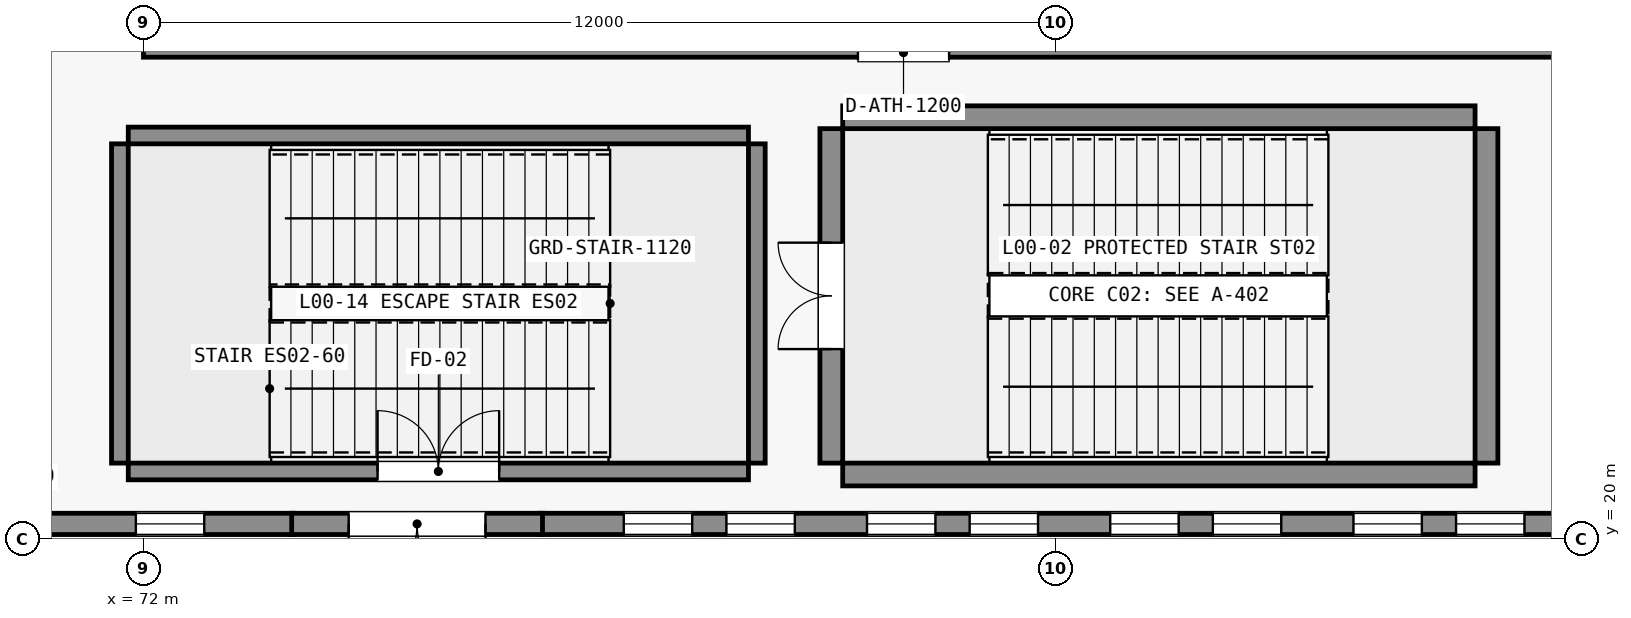
"""IFC4 building model, lengths in metres.
Left out: names, types, materials, properties, quantities, classifications, styles, units other than length and angle.
Written with IfcOpenShell. Run it as: python <this file> out.ifc"""

import sys

from ifc_helpers import new_model, si_unit, direction, frame, frame_2d, origin, place, context, subcontext, project, spatial, rectangle, extrude, element, fill, save


model = new_model("IFC4")
c1 = context("Model", 3, precision=1e-05, world=origin(), true_north=direction((0.0, 1.0)))
c2 = subcontext(c1, "Body", "Model", "MODEL_VIEW")
j1 = project(units=[si_unit("LENGTHUNIT", "METRE"), si_unit("PLANEANGLEUNIT", "RADIAN")], contexts=[c1])
p1 = place(None, origin())
s1 = spatial("IfcSite", under=j1, at=p1, CompositionType="ELEMENT")
p2 = place(p1, origin())
s2 = spatial("IfcBuilding", under=s1, at=p2, CompositionType="ELEMENT")
p3 = place(p2, origin())
s3 = spatial("IfcBuildingStorey", under=s2, at=p3, CompositionType="ELEMENT", Elevation=0.0)
for number, where, z_axis, x_axis in (
    (1, (81.2, 20.85, 0.0), (0.0, 0.0, 1.0), (1.0, 0.0, 0.0)),
    (2, (81.2, 25.55, 0.0), (0.0, 0.0, 1.0), (1.0, 0.0, 0.0)),
):
    element("IfcWall", number, at=place(p3, frame(where, z_axis=z_axis, x_axis=x_axis)), inside=s3, PredefinedType="SHEAR", context=c2, shape_type="SweptSolid", body=[
        extrude(rectangle(XDim=8.32, YDim=0.3, at=frame_2d((4.16, 0.0))), origin(), (0.0, 0.0, 1.0), 6.0),
    ])
p4 = place(p3, frame((81.05, 21.0, 0.0), z_axis=(0.0, 0.0, 1.0), x_axis=(0.0, 1.0, 0.0)))
e3 = element("IfcWall", 3, at=p4, inside=s3, PredefinedType="SHEAR", context=c2, shape_type="SweptSolid", body=[
    extrude(rectangle(XDim=4.4, YDim=0.3, at=frame_2d((2.2, 0.0))), origin(), (0.0, 0.0, 1.0), 6.0),
])
p5 = place(p4, frame((1.5, 0.0, 0.0)))
e4 = element("IfcOpeningElement", 4, at=p5, cuts=e3, PredefinedType="OPENING", context=c2, shape_type="SweptSolid", body=[
    extrude(rectangle(XDim=1.4, YDim=2.2, at=frame_2d((0.7, 1.1))), frame((0.0, 0.16, 0.0), z_axis=(0.0, -1.0, 0.0), x_axis=(1.0, 0.0, 0.0)), (0.0, 0.0, 1.0), 0.32),
])
p6 = place(p3, frame((89.67, 21.0, 0.0), z_axis=(0.0, 0.0, 1.0), x_axis=(0.0, 1.0, 0.0)))
e5 = element("IfcWall", 5, at=p6, inside=s3, PredefinedType="SHEAR", context=c2, shape_type="SweptSolid", body=[
    extrude(rectangle(XDim=4.4, YDim=0.3, at=frame_2d((2.2, 0.0))), origin(), (0.0, 0.0, 1.0), 6.0),
])
p7 = place(p3, frame((47.05, 20.2, 0.0), z_axis=(0.0, 0.0, 1.0), x_axis=(1.0, 0.0, 0.0)))
e6 = element("IfcWall", 6, at=p7, inside=s3, PredefinedType="STANDARD", context=c2, shape_type="SweptSolid", body=[
    extrude(rectangle(XDim=26.93, YDim=0.28, at=frame_2d((13.465, 0.0))), origin(), (0.0, 0.0, 1.0), 5.64),
])
p8 = place(p7, frame((18.8, 0.0, 0.0)))
e7 = element("IfcOpeningElement", 7, at=p8, cuts=e6, PredefinedType="OPENING", context=c2, shape_type="SweptSolid", body=[
    extrude(rectangle(XDim=2.4, YDim=2.5, at=frame_2d((1.2, 1.25))), frame((0.0, 0.15, 0.0), z_axis=(0.0, -1.0, 0.0), x_axis=(1.0, 0.0, 0.0)), (0.0, 0.0, 1.0), 0.3),
])
p9 = place(p7, frame((2.45, 0.0, 0.95)))
e8 = element("IfcOpeningElement", 8, at=p9, cuts=e6, PredefinedType="OPENING", context=c2, shape_type="SweptSolid", body=[
    extrude(rectangle(XDim=0.9, YDim=2.85, at=frame_2d((0.45, 1.425))), frame((0.0, 0.15, 0.0), z_axis=(0.0, -1.0, 0.0), x_axis=(1.0, 0.0, 0.0)), (0.0, 0.0, 1.0), 0.3),
])
p10 = place(p7, frame((4.3, 0.0, 0.95)))
e9 = element("IfcOpeningElement", 9, at=p10, cuts=e6, PredefinedType="OPENING", context=c2, shape_type="SweptSolid", body=[
    extrude(rectangle(XDim=0.9, YDim=2.85, at=frame_2d((0.45, 1.425))), frame((0.0, 0.15, 0.0), z_axis=(0.0, -1.0, 0.0), x_axis=(1.0, 0.0, 0.0)), (0.0, 0.0, 1.0), 0.3),
])
p11 = place(p7, frame((5.65, 0.0, 0.95)))
e10 = element("IfcOpeningElement", 10, at=p11, cuts=e6, PredefinedType="OPENING", context=c2, shape_type="SweptSolid", body=[
    extrude(rectangle(XDim=0.9, YDim=2.85, at=frame_2d((0.45, 1.425))), frame((0.0, 0.15, 0.0), z_axis=(0.0, -1.0, 0.0), x_axis=(1.0, 0.0, 0.0)), (0.0, 0.0, 1.0), 0.3),
])
p12 = place(p7, frame((7.5, 0.0, 0.95)))
e11 = element("IfcOpeningElement", 11, at=p12, cuts=e6, PredefinedType="OPENING", context=c2, shape_type="SweptSolid", body=[
    extrude(rectangle(XDim=0.9, YDim=2.85, at=frame_2d((0.45, 1.425))), frame((0.0, 0.15, 0.0), z_axis=(0.0, -1.0, 0.0), x_axis=(1.0, 0.0, 0.0)), (0.0, 0.0, 1.0), 0.3),
])
p13 = place(p7, frame((8.85, 0.0, 0.95)))
e12 = element("IfcOpeningElement", 12, at=p13, cuts=e6, PredefinedType="OPENING", context=c2, shape_type="SweptSolid", body=[
    extrude(rectangle(XDim=0.9, YDim=2.85, at=frame_2d((0.45, 1.425))), frame((0.0, 0.15, 0.0), z_axis=(0.0, -1.0, 0.0), x_axis=(1.0, 0.0, 0.0)), (0.0, 0.0, 1.0), 0.3),
])
p14 = place(p7, frame((13.9, 0.0, 0.95)))
e13 = element("IfcOpeningElement", 13, at=p14, cuts=e6, PredefinedType="OPENING", context=c2, shape_type="SweptSolid", body=[
    extrude(rectangle(XDim=0.9, YDim=2.85, at=frame_2d((0.45, 1.425))), frame((0.0, 0.15, 0.0), z_axis=(0.0, -1.0, 0.0), x_axis=(1.0, 0.0, 0.0)), (0.0, 0.0, 1.0), 0.3),
])
p15 = place(p7, frame((15.25, 0.0, 0.95)))
e14 = element("IfcOpeningElement", 14, at=p15, cuts=e6, PredefinedType="OPENING", context=c2, shape_type="SweptSolid", body=[
    extrude(rectangle(XDim=0.9, YDim=2.85, at=frame_2d((0.45, 1.425))), frame((0.0, 0.15, 0.0), z_axis=(0.0, -1.0, 0.0), x_axis=(1.0, 0.0, 0.0)), (0.0, 0.0, 1.0), 0.3),
])
p16 = place(p7, frame((17.1, 0.0, 0.95)))
e15 = element("IfcOpeningElement", 15, at=p16, cuts=e6, PredefinedType="OPENING", context=c2, shape_type="SweptSolid", body=[
    extrude(rectangle(XDim=0.9, YDim=2.85, at=frame_2d((0.45, 1.425))), frame((0.0, 0.15, 0.0), z_axis=(0.0, -1.0, 0.0), x_axis=(1.0, 0.0, 0.0)), (0.0, 0.0, 1.0), 0.3),
])
p17 = place(p7, frame((24.85, 0.0, 0.95)))
e16 = element("IfcOpeningElement", 16, at=p17, cuts=e6, PredefinedType="OPENING", context=c2, shape_type="SweptSolid", body=[
    extrude(rectangle(XDim=0.9, YDim=2.85, at=frame_2d((0.45, 1.425))), frame((0.0, 0.15, 0.0), z_axis=(0.0, -1.0, 0.0), x_axis=(1.0, 0.0, 0.0)), (0.0, 0.0, 1.0), 0.3),
])
p18 = place(p3, frame((77.22, 20.2, 0.0), z_axis=(0.0, 0.0, 1.0), x_axis=(1.0, 0.0, 0.0)))
e17 = element("IfcWall", 17, at=p18, inside=s3, PredefinedType="STANDARD", context=c2, shape_type="SweptSolid", body=[
    extrude(rectangle(XDim=16.78, YDim=0.28, at=frame_2d((8.39, 0.0))), origin(), (0.0, 0.0, 1.0), 5.64),
])
p19 = place(p18, frame((1.1, 0.0, 0.95)))
e18 = element("IfcOpeningElement", 18, at=p19, cuts=e17, PredefinedType="OPENING", context=c2, shape_type="SweptSolid", body=[
    extrude(rectangle(XDim=0.9, YDim=2.85, at=frame_2d((0.45, 1.425))), frame((0.0, 0.15, 0.0), z_axis=(0.0, -1.0, 0.0), x_axis=(1.0, 0.0, 0.0)), (0.0, 0.0, 1.0), 0.3),
])
p20 = place(p18, frame((2.45, 0.0, 0.95)))
e19 = element("IfcOpeningElement", 19, at=p20, cuts=e17, PredefinedType="OPENING", context=c2, shape_type="SweptSolid", body=[
    extrude(rectangle(XDim=0.9, YDim=2.85, at=frame_2d((0.45, 1.425))), frame((0.0, 0.15, 0.0), z_axis=(0.0, -1.0, 0.0), x_axis=(1.0, 0.0, 0.0)), (0.0, 0.0, 1.0), 0.3),
])
p21 = place(p18, frame((4.3, 0.0, 0.95)))
e20 = element("IfcOpeningElement", 20, at=p21, cuts=e17, PredefinedType="OPENING", context=c2, shape_type="SweptSolid", body=[
    extrude(rectangle(XDim=0.9, YDim=2.85, at=frame_2d((0.45, 1.425))), frame((0.0, 0.15, 0.0), z_axis=(0.0, -1.0, 0.0), x_axis=(1.0, 0.0, 0.0)), (0.0, 0.0, 1.0), 0.3),
])
p22 = place(p18, frame((5.65, 0.0, 0.95)))
e21 = element("IfcOpeningElement", 21, at=p22, cuts=e17, PredefinedType="OPENING", context=c2, shape_type="SweptSolid", body=[
    extrude(rectangle(XDim=0.9, YDim=2.85, at=frame_2d((0.45, 1.425))), frame((0.0, 0.15, 0.0), z_axis=(0.0, -1.0, 0.0), x_axis=(1.0, 0.0, 0.0)), (0.0, 0.0, 1.0), 0.3),
])
p23 = place(p18, frame((7.5, 0.0, 0.95)))
e22 = element("IfcOpeningElement", 22, at=p23, cuts=e17, PredefinedType="OPENING", context=c2, shape_type="SweptSolid", body=[
    extrude(rectangle(XDim=0.9, YDim=2.85, at=frame_2d((0.45, 1.425))), frame((0.0, 0.15, 0.0), z_axis=(0.0, -1.0, 0.0), x_axis=(1.0, 0.0, 0.0)), (0.0, 0.0, 1.0), 0.3),
])
p24 = place(p18, frame((8.85, 0.0, 0.95)))
e23 = element("IfcOpeningElement", 23, at=p24, cuts=e17, PredefinedType="OPENING", context=c2, shape_type="SweptSolid", body=[
    extrude(rectangle(XDim=0.9, YDim=2.85, at=frame_2d((0.45, 1.425))), frame((0.0, 0.15, 0.0), z_axis=(0.0, -1.0, 0.0), x_axis=(1.0, 0.0, 0.0)), (0.0, 0.0, 1.0), 0.3),
])
p25 = place(p18, frame((10.7, 0.0, 0.95)))
e24 = element("IfcOpeningElement", 24, at=p25, cuts=e17, PredefinedType="OPENING", context=c2, shape_type="SweptSolid", body=[
    extrude(rectangle(XDim=0.9, YDim=2.85, at=frame_2d((0.45, 1.425))), frame((0.0, 0.15, 0.0), z_axis=(0.0, -1.0, 0.0), x_axis=(1.0, 0.0, 0.0)), (0.0, 0.0, 1.0), 0.3),
])
p26 = place(p18, frame((12.05, 0.0, 0.95)))
e25 = element("IfcOpeningElement", 25, at=p26, cuts=e17, PredefinedType="OPENING", context=c2, shape_type="SweptSolid", body=[
    extrude(rectangle(XDim=0.9, YDim=2.85, at=frame_2d((0.45, 1.425))), frame((0.0, 0.15, 0.0), z_axis=(0.0, -1.0, 0.0), x_axis=(1.0, 0.0, 0.0)), (0.0, 0.0, 1.0), 0.3),
])
p27 = place(p3, frame((71.8, 20.89, 0.0), z_axis=(0.0, 0.0, 1.0), x_axis=(1.0, 0.0, 0.0)))
e26 = element("IfcWall", 26, at=p27, inside=s3, PredefinedType="SHEAR", context=c2, shape_type="SweptSolid", body=[
    extrude(rectangle(XDim=8.16, YDim=0.22, at=frame_2d((4.08, 0.0))), origin(), (0.0, 0.0, 1.0), 6.0),
])
p28 = place(p27, frame((3.28, 0.0, 0.0)))
e27 = element("IfcOpeningElement", 27, at=p28, cuts=e26, PredefinedType="OPENING", context=c2, shape_type="SweptSolid", body=[
    extrude(rectangle(XDim=1.6, YDim=2.2, at=frame_2d((0.8, 1.1))), frame((0.0, 0.12, 0.0), z_axis=(0.0, -1.0, 0.0), x_axis=(1.0, 0.0, 0.0)), (0.0, 0.0, 1.0), 0.24),
])
p29 = place(p3, frame((71.8, 25.31, 0.0), z_axis=(0.0, 0.0, 1.0), x_axis=(1.0, 0.0, 0.0)))
e28 = element("IfcWall", 28, at=p29, inside=s3, PredefinedType="SHEAR", context=c2, shape_type="SweptSolid", body=[
    extrude(rectangle(XDim=8.16, YDim=0.22, at=frame_2d((4.08, 0.0))), origin(), (0.0, 0.0, 1.0), 6.0),
])
for number, where, z_axis, x_axis in (
    (29, (71.69, 21.0, 0.0), (0.0, 0.0, 1.0), (0.0, 1.0, 0.0)),
    (30, (80.07, 21.0, 0.0), (0.0, 0.0, 1.0), (0.0, 1.0, 0.0)),
):
    element("IfcWall", number, at=place(p3, frame(where, z_axis=z_axis, x_axis=x_axis)), inside=s3, PredefinedType="SHEAR", context=c2, shape_type="SweptSolid", body=[
        extrude(rectangle(XDim=4.2, YDim=0.22, at=frame_2d((2.1, 0.0))), origin(), (0.0, 0.0, 1.0), 6.0),
    ])
p30 = place(p3, frame((77.25, 20.2, 0.0), z_axis=(0.0, 0.0, 1.0), x_axis=(-1.0, 0.0, 0.0)))
e31 = element("IfcWall", 31, at=p30, inside=s3, PredefinedType="STANDARD", context=c2, shape_type="SweptSolid", body=[
    extrude(rectangle(XDim=3.3, YDim=0.28, at=frame_2d((1.65, 0.0))), origin(), (0.0, 0.0, 1.0), 5.64),
])
p31 = place(p30, frame((0.75, 0.0, 0.0)))
e32 = element("IfcOpeningElement", 32, at=p31, cuts=e31, PredefinedType="OPENING", context=c2, shape_type="SweptSolid", body=[
    extrude(rectangle(XDim=1.8, YDim=2.25, at=frame_2d((0.9, 1.125))), frame((0.0, 0.15, 0.0), z_axis=(0.0, -1.0, 0.0), x_axis=(1.0, 0.0, 0.0)), (0.0, 0.0, 1.0), 0.3),
])
p32 = place(p3, frame((72.0, 26.4, 0.0), z_axis=(0.0, 0.0, 1.0), x_axis=(1.0, 0.0, 0.0)))
e33 = element("IfcWall", 33, at=p32, inside=s3, PredefinedType="PARTITIONING", context=c2, shape_type="SweptSolid", body=[
    extrude(rectangle(XDim=20.0, YDim=0.12, at=frame_2d((10.0, 0.0))), origin(), (0.0, 0.0, 1.0), 5.64),
])
p33 = place(p32, frame((9.4, 0.0, 0.0)))
e34 = element("IfcOpeningElement", 34, at=p33, cuts=e33, PredefinedType="OPENING", context=c2, shape_type="SweptSolid", body=[
    extrude(rectangle(XDim=1.2, YDim=2.2, at=frame_2d((0.6, 1.1))), frame((0.0, 0.07, 0.0), z_axis=(0.0, -1.0, 0.0), x_axis=(1.0, 0.0, 0.0)), (0.0, 0.0, 1.0), 0.14),
])
p34 = place(p17, origin())
e35 = element("IfcWindow", 35, at=p34, inside=s3, PartitioningType="DOUBLE_PANEL_VERTICAL", PredefinedType="WINDOW", context=c2, shape_type="SweptSolid", body=[
    extrude(rectangle(XDim=0.9, YDim=2.85, at=frame_2d((0.45, 1.425))), frame((0.0, 0.03, 0.0), z_axis=(0.0, -1.0, 0.0), x_axis=(1.0, 0.0, 0.0)), (0.0, 0.0, 1.0), 0.06),
])
fill(e16, e35)
p35 = place(p19, origin())
e36 = element("IfcWindow", 36, at=p35, inside=s3, PartitioningType="DOUBLE_PANEL_VERTICAL", PredefinedType="WINDOW", context=c2, shape_type="SweptSolid", body=[
    extrude(rectangle(XDim=0.9, YDim=2.85, at=frame_2d((0.45, 1.425))), frame((0.0, 0.03, 0.0), z_axis=(0.0, -1.0, 0.0), x_axis=(1.0, 0.0, 0.0)), (0.0, 0.0, 1.0), 0.06),
])
fill(e18, e36)
p36 = place(p20, origin())
e37 = element("IfcWindow", 37, at=p36, inside=s3, PartitioningType="DOUBLE_PANEL_VERTICAL", PredefinedType="WINDOW", context=c2, shape_type="SweptSolid", body=[
    extrude(rectangle(XDim=0.9, YDim=2.85, at=frame_2d((0.45, 1.425))), frame((0.0, 0.03, 0.0), z_axis=(0.0, -1.0, 0.0), x_axis=(1.0, 0.0, 0.0)), (0.0, 0.0, 1.0), 0.06),
])
fill(e19, e37)
p37 = place(p21, origin())
e38 = element("IfcWindow", 38, at=p37, inside=s3, PartitioningType="DOUBLE_PANEL_VERTICAL", PredefinedType="WINDOW", context=c2, shape_type="SweptSolid", body=[
    extrude(rectangle(XDim=0.9, YDim=2.85, at=frame_2d((0.45, 1.425))), frame((0.0, 0.03, 0.0), z_axis=(0.0, -1.0, 0.0), x_axis=(1.0, 0.0, 0.0)), (0.0, 0.0, 1.0), 0.06),
])
fill(e20, e38)
p38 = place(p22, origin())
e39 = element("IfcWindow", 39, at=p38, inside=s3, PartitioningType="DOUBLE_PANEL_VERTICAL", PredefinedType="WINDOW", context=c2, shape_type="SweptSolid", body=[
    extrude(rectangle(XDim=0.9, YDim=2.85, at=frame_2d((0.45, 1.425))), frame((0.0, 0.03, 0.0), z_axis=(0.0, -1.0, 0.0), x_axis=(1.0, 0.0, 0.0)), (0.0, 0.0, 1.0), 0.06),
])
fill(e21, e39)
p39 = place(p23, origin())
e40 = element("IfcWindow", 40, at=p39, inside=s3, PartitioningType="DOUBLE_PANEL_VERTICAL", PredefinedType="WINDOW", context=c2, shape_type="SweptSolid", body=[
    extrude(rectangle(XDim=0.9, YDim=2.85, at=frame_2d((0.45, 1.425))), frame((0.0, 0.03, 0.0), z_axis=(0.0, -1.0, 0.0), x_axis=(1.0, 0.0, 0.0)), (0.0, 0.0, 1.0), 0.06),
])
fill(e22, e40)
p40 = place(p24, origin())
e41 = element("IfcWindow", 41, at=p40, inside=s3, PartitioningType="DOUBLE_PANEL_VERTICAL", PredefinedType="WINDOW", context=c2, shape_type="SweptSolid", body=[
    extrude(rectangle(XDim=0.9, YDim=2.85, at=frame_2d((0.45, 1.425))), frame((0.0, 0.03, 0.0), z_axis=(0.0, -1.0, 0.0), x_axis=(1.0, 0.0, 0.0)), (0.0, 0.0, 1.0), 0.06),
])
fill(e23, e41)
p41 = place(p25, origin())
e42 = element("IfcWindow", 42, at=p41, inside=s3, PartitioningType="DOUBLE_PANEL_VERTICAL", PredefinedType="WINDOW", context=c2, shape_type="SweptSolid", body=[
    extrude(rectangle(XDim=0.9, YDim=2.85, at=frame_2d((0.45, 1.425))), frame((0.0, 0.03, 0.0), z_axis=(0.0, -1.0, 0.0), x_axis=(1.0, 0.0, 0.0)), (0.0, 0.0, 1.0), 0.06),
])
fill(e24, e42)
p42 = place(p26, origin())
e43 = element("IfcWindow", 43, at=p42, inside=s3, PartitioningType="DOUBLE_PANEL_VERTICAL", PredefinedType="WINDOW", context=c2, shape_type="SweptSolid", body=[
    extrude(rectangle(XDim=0.9, YDim=2.85, at=frame_2d((0.45, 1.425))), frame((0.0, 0.03, 0.0), z_axis=(0.0, -1.0, 0.0), x_axis=(1.0, 0.0, 0.0)), (0.0, 0.0, 1.0), 0.06),
])
fill(e25, e43)
p43 = place(p5, origin())
e44 = element("IfcDoor", 44, at=p43, inside=s3, OperationType="DOUBLE_DOOR_SINGLE_SWING", PredefinedType="DOOR", context=c2, shape_type="SweptSolid", body=[
    extrude(rectangle(XDim=1.4, YDim=2.2, at=frame_2d((0.7, 1.1))), frame((0.0, 0.025, 0.0), z_axis=(0.0, -1.0, 0.0), x_axis=(1.0, 0.0, 0.0)), (0.0, 0.0, 1.0), 0.05),
])
fill(e4, e44)
p44 = place(p28, origin())
e45 = element("IfcDoor", 45, at=p44, inside=s3, OperationType="DOUBLE_DOOR_SINGLE_SWING", PredefinedType="DOOR", context=c2, shape_type="SweptSolid", body=[
    extrude(rectangle(XDim=1.6, YDim=2.2, at=frame_2d((0.8, 1.1))), frame((0.0, 0.025, 0.0), z_axis=(0.0, -1.0, 0.0), x_axis=(1.0, 0.0, 0.0)), (0.0, 0.0, 1.0), 0.05),
])
fill(e27, e45)
p45 = place(p31, origin())
e46 = element("IfcDoor", 46, at=p45, inside=s3, OperationType="DOUBLE_DOOR_SINGLE_SWING", PredefinedType="DOOR", context=c2, shape_type="SweptSolid", body=[
    extrude(rectangle(XDim=1.8, YDim=2.25, at=frame_2d((0.9, 1.125))), frame((0.0, 0.025, 0.0), z_axis=(0.0, -1.0, 0.0), x_axis=(1.0, 0.0, 0.0)), (0.0, 0.0, 1.0), 0.05),
])
fill(e32, e46)
p46 = place(p33, origin())
e47 = element("IfcDoor", 47, at=p46, inside=s3, OperationType="SINGLE_SWING_RIGHT", PredefinedType="DOOR", context=c2, shape_type="SweptSolid", body=[
    extrude(rectangle(XDim=1.2, YDim=2.2, at=frame_2d((0.6, 1.1))), frame((0.0, 0.025, 0.0), z_axis=(0.0, -1.0, 0.0), x_axis=(1.0, 0.0, 0.0)), (0.0, 0.0, 1.0), 0.05),
])
fill(e34, e47)
save(model, sys.argv[1])
